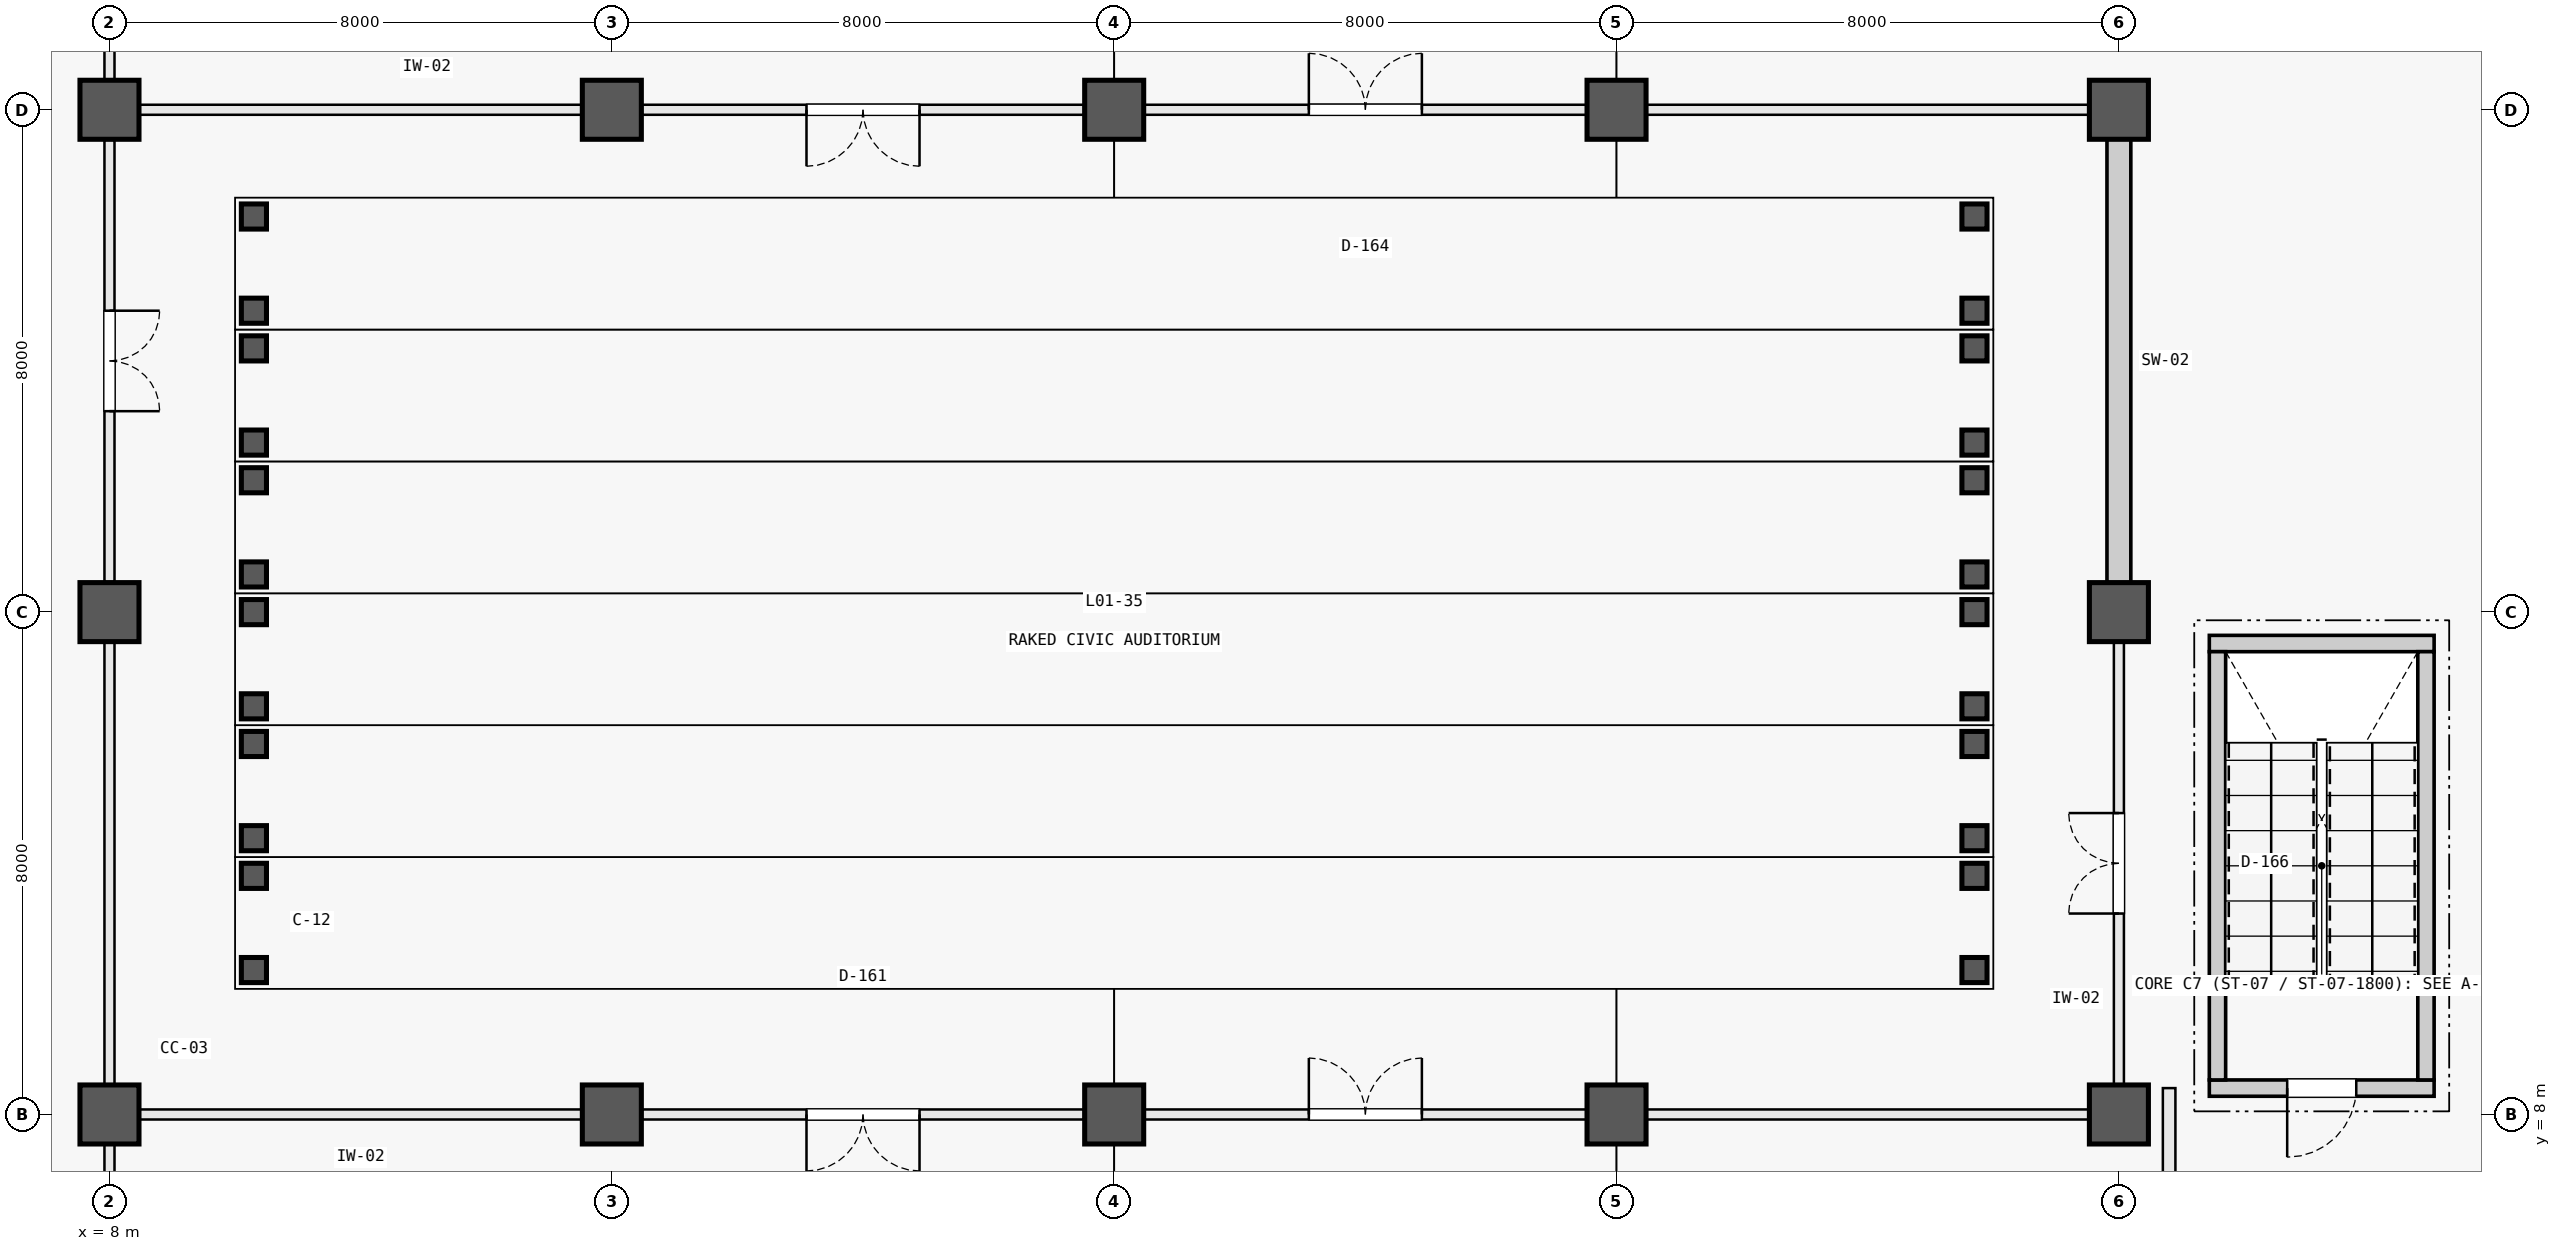
"""IFC4 building model, lengths in metres.
Left out: names, types, materials, properties, quantities, classifications, styles, units other than length and angle.
Written with IfcOpenShell. Run it as: python <this file> out.ifc"""

import sys

from ifc_helpers import new_model, si_unit, direction, frame, frame_2d, origin, origin_2d, place, context, subcontext, project, spatial, rectangle, circle, extrude, element, fill, save


model = new_model("IFC4")
c1 = context("Model", 3, precision=1e-05, world=origin(), true_north=direction((0.0, 1.0)))
c2 = subcontext(c1, "Body", "Model", "MODEL_VIEW")
j1 = project(units=[si_unit("LENGTHUNIT", "METRE"), si_unit("PLANEANGLEUNIT", "RADIAN")], contexts=[c1])
p1 = place(None, origin())
s1 = spatial("IfcSite", under=j1, at=p1, CompositionType="ELEMENT")
p2 = place(p1, origin())
s2 = spatial("IfcBuilding", under=s1, at=p2, CompositionType="ELEMENT")
p3 = place(p2, origin())
s3 = spatial("IfcBuildingStorey", under=s2, at=p3, CompositionType="ELEMENT", Elevation=0.0)
for number, where, z_axis, x_axis in (
    (1, (8.0, 8.0, 0.0), (0.0, 0.0, 1.0), (1.0, 0.0, 0.0)),
    (2, (8.0, 16.0, 0.0), (0.0, 0.0, 1.0), (1.0, 0.0, 0.0)),
    (3, (8.0, 24.0, 0.0), (0.0, 0.0, 1.0), (1.0, 0.0, 0.0)),
    (4, (16.0, 8.0, 0.0), (0.0, 0.0, 1.0), (1.0, 0.0, 0.0)),
    (5, (16.0, 24.0, 0.0), (0.0, 0.0, 1.0), (1.0, 0.0, 0.0)),
    (6, (24.0, 8.0, 0.0), (0.0, 0.0, 1.0), (1.0, 0.0, 0.0)),
    (7, (24.0, 24.0, 0.0), (0.0, 0.0, 1.0), (1.0, 0.0, 0.0)),
    (8, (32.0, 8.0, 0.0), (0.0, 0.0, 1.0), (1.0, 0.0, 0.0)),
    (9, (32.0, 24.0, 0.0), (0.0, 0.0, 1.0), (1.0, 0.0, 0.0)),
    (10, (40.0, 8.0, 0.0), (0.0, 0.0, 1.0), (1.0, 0.0, 0.0)),
    (11, (40.0, 16.0, 0.0), (0.0, 0.0, 1.0), (1.0, 0.0, 0.0)),
    (12, (40.0, 24.0, 0.0), (0.0, 0.0, 1.0), (1.0, 0.0, 0.0)),
):
    element("IfcColumn", number, at=place(p3, frame(where, z_axis=z_axis, x_axis=x_axis)), inside=s3, PredefinedType="COLUMN", context=c2, shape_type="SweptSolid", body=[
        extrude(circle(Radius=0.47, at=origin_2d()), origin(), (0.0, 0.0, 1.0), 5.4),
    ])
p4 = place(p3, frame((40.0, 16.47, 0.0), z_axis=(0.0, 0.0, 1.0), x_axis=(0.0, 1.0, 0.0)))
e13 = element("IfcWall", 13, at=p4, inside=s3, PredefinedType="SHEAR", context=c2, shape_type="SweptSolid", body=[
    extrude(rectangle(XDim=7.06, YDim=0.38, at=frame_2d((3.53, 0.0))), origin(), (0.0, 0.0, 1.0), 5.03),
])
for number, where, z_axis, x_axis in (
    (14, (10.3, 10.3, 0.0), (0.0, 0.0, 1.0), (1.0, 0.0, 0.0)),
    (15, (37.7, 10.3, 0.0), (0.0, 0.0, 1.0), (1.0, 0.0, 0.0)),
    (16, (37.7, 11.8, 0.0), (0.0, 0.0, 1.0), (1.0, 0.0, 0.0)),
    (17, (10.3, 11.8, 0.0), (0.0, 0.0, 1.0), (1.0, 0.0, 0.0)),
):
    element("IfcColumn", number, at=place(p3, frame(where, z_axis=z_axis, x_axis=x_axis)), inside=s3, PredefinedType="COLUMN", context=c2, shape_type="SweptSolid", body=[
        extrude(rectangle(XDim=0.4, YDim=0.4, at=origin_2d()), origin(), (0.0, 0.0, 1.0), 0.12),
    ])
for number, where, z_axis, x_axis in (
    (18, (10.3, 12.4, 0.0), (0.0, 0.0, 1.0), (1.0, 0.0, 0.0)),
    (19, (37.7, 12.4, 0.0), (0.0, 0.0, 1.0), (1.0, 0.0, 0.0)),
    (20, (37.7, 13.9, 0.0), (0.0, 0.0, 1.0), (1.0, 0.0, 0.0)),
    (21, (10.3, 13.9, 0.0), (0.0, 0.0, 1.0), (1.0, 0.0, 0.0)),
):
    element("IfcColumn", number, at=place(p3, frame(where, z_axis=z_axis, x_axis=x_axis)), inside=s3, PredefinedType="COLUMN", context=c2, shape_type="SweptSolid", body=[
        extrude(rectangle(XDim=0.4, YDim=0.4, at=origin_2d()), origin(), (0.0, 0.0, 1.0), 0.41),
    ])
for number, where, z_axis, x_axis in (
    (22, (10.3, 14.5, 0.0), (0.0, 0.0, 1.0), (1.0, 0.0, 0.0)),
    (23, (37.7, 14.5, 0.0), (0.0, 0.0, 1.0), (1.0, 0.0, 0.0)),
    (24, (37.7, 16.0, 0.0), (0.0, 0.0, 1.0), (1.0, 0.0, 0.0)),
    (25, (10.3, 16.0, 0.0), (0.0, 0.0, 1.0), (1.0, 0.0, 0.0)),
):
    element("IfcColumn", number, at=place(p3, frame(where, z_axis=z_axis, x_axis=x_axis)), inside=s3, PredefinedType="COLUMN", context=c2, shape_type="SweptSolid", body=[
        extrude(rectangle(XDim=0.4, YDim=0.4, at=origin_2d()), origin(), (0.0, 0.0, 1.0), 0.7),
    ])
for number, where, z_axis, x_axis in (
    (26, (10.3, 16.6, 0.0), (0.0, 0.0, 1.0), (1.0, 0.0, 0.0)),
    (27, (37.7, 16.6, 0.0), (0.0, 0.0, 1.0), (1.0, 0.0, 0.0)),
    (28, (37.7, 18.1, 0.0), (0.0, 0.0, 1.0), (1.0, 0.0, 0.0)),
    (29, (10.3, 18.1, 0.0), (0.0, 0.0, 1.0), (1.0, 0.0, 0.0)),
):
    element("IfcColumn", number, at=place(p3, frame(where, z_axis=z_axis, x_axis=x_axis)), inside=s3, PredefinedType="COLUMN", context=c2, shape_type="SweptSolid", body=[
        extrude(rectangle(XDim=0.4, YDim=0.4, at=origin_2d()), origin(), (0.0, 0.0, 1.0), 0.99),
    ])
for number, where, z_axis, x_axis in (
    (30, (10.3, 18.7, 0.0), (0.0, 0.0, 1.0), (1.0, 0.0, 0.0)),
    (31, (37.7, 18.7, 0.0), (0.0, 0.0, 1.0), (1.0, 0.0, 0.0)),
    (32, (37.7, 20.2, 0.0), (0.0, 0.0, 1.0), (1.0, 0.0, 0.0)),
    (33, (10.3, 20.2, 0.0), (0.0, 0.0, 1.0), (1.0, 0.0, 0.0)),
):
    element("IfcColumn", number, at=place(p3, frame(where, z_axis=z_axis, x_axis=x_axis)), inside=s3, PredefinedType="COLUMN", context=c2, shape_type="SweptSolid", body=[
        extrude(rectangle(XDim=0.4, YDim=0.4, at=origin_2d()), origin(), (0.0, 0.0, 1.0), 1.28),
    ])
for number, where, z_axis, x_axis in (
    (34, (10.3, 20.8, 0.0), (0.0, 0.0, 1.0), (1.0, 0.0, 0.0)),
    (35, (37.7, 20.8, 0.0), (0.0, 0.0, 1.0), (1.0, 0.0, 0.0)),
    (36, (37.7, 22.3, 0.0), (0.0, 0.0, 1.0), (1.0, 0.0, 0.0)),
    (37, (10.3, 22.3, 0.0), (0.0, 0.0, 1.0), (1.0, 0.0, 0.0)),
):
    element("IfcColumn", number, at=place(p3, frame(where, z_axis=z_axis, x_axis=x_axis)), inside=s3, PredefinedType="COLUMN", context=c2, shape_type="SweptSolid", body=[
        extrude(rectangle(XDim=0.4, YDim=0.4, at=origin_2d()), origin(), (0.0, 0.0, 1.0), 1.57),
    ])
p5 = place(p3, frame((41.44, 8.42, 0.0), z_axis=(0.0, 0.0, 1.0), x_axis=(1.0, 0.0, 0.0)))
e38 = element("IfcWall", 38, at=p5, inside=s3, PredefinedType="SOLIDWALL", context=c2, shape_type="SweptSolid", body=[
    extrude(rectangle(XDim=3.58, YDim=0.26, at=frame_2d((1.79, 0.0))), origin(), (0.0, 0.0, 1.0), 5.4),
])
p6 = place(p5, frame((1.24, 0.0, 0.0)))
e39 = element("IfcOpeningElement", 39, at=p6, cuts=e38, PredefinedType="OPENING", context=c2, shape_type="SweptSolid", body=[
    extrude(rectangle(XDim=1.1, YDim=2.2, at=frame_2d((0.55, 1.1))), frame((0.0, 0.142, 0.0), z_axis=(0.0, -1.0, 0.0), x_axis=(1.0, 0.0, 0.0)), (0.0, 0.0, 1.0), 0.284),
])
p7 = place(p3, frame((41.44, 15.5, 0.0), z_axis=(0.0, 0.0, 1.0), x_axis=(1.0, 0.0, 0.0)))
e40 = element("IfcWall", 40, at=p7, inside=s3, PredefinedType="SOLIDWALL", context=c2, shape_type="SweptSolid", body=[
    extrude(rectangle(XDim=3.58, YDim=0.26, at=frame_2d((1.79, 0.0))), origin(), (0.0, 0.0, 1.0), 5.4),
])
for number, where, z_axis, x_axis in (
    (41, (41.57, 8.55, 0.0), (0.0, 0.0, 1.0), (0.0, 1.0, 0.0)),
    (42, (44.89, 8.55, 0.0), (0.0, 0.0, 1.0), (0.0, 1.0, 0.0)),
):
    element("IfcWall", number, at=place(p3, frame(where, z_axis=z_axis, x_axis=x_axis)), inside=s3, PredefinedType="SOLIDWALL", context=c2, shape_type="SweptSolid", body=[
        extrude(rectangle(XDim=6.82, YDim=0.26, at=frame_2d((3.41, 0.0))), origin(), (0.0, 0.0, 1.0), 5.4),
    ])
p8 = place(p3, frame((40.8, 0.26, 0.0), z_axis=(0.0, 0.0, 1.0), x_axis=(0.0, 1.0, 0.0)))
e43 = element("IfcWall", 43, at=p8, inside=s3, PredefinedType="PARTITIONING", context=c2, shape_type="SweptSolid", body=[
    extrude(rectangle(XDim=8.16, YDim=0.2, at=frame_2d((4.08, 0.0))), origin(), (0.0, 0.0, 1.0), 3.88),
])
p9 = place(p8, frame((3.48, 0.0, 0.0)))
e44 = element("IfcOpeningElement", 44, at=p9, cuts=e43, PredefinedType="OPENING", context=c2, shape_type="SweptSolid", body=[
    extrude(rectangle(XDim=1.2, YDim=2.25, at=frame_2d((0.6, 1.125))), frame((0.0, 0.112, 0.0), z_axis=(0.0, -1.0, 0.0), x_axis=(1.0, 0.0, 0.0)), (0.0, 0.0, 1.0), 0.224),
])
p10 = place(p3, frame((8.48, 8.0, 0.0), z_axis=(0.0, 0.0, 1.0), x_axis=(1.0, 0.0, 0.0)))
e45 = element("IfcWall", 45, at=p10, inside=s3, PredefinedType="PARTITIONING", context=c2, shape_type="SweptSolid", body=[
    extrude(rectangle(XDim=7.04, YDim=0.16, at=frame_2d((3.52, 0.0))), origin(), (0.0, 0.0, 1.0), 3.88),
])
p11 = place(p3, frame((16.48, 8.0, 0.0), z_axis=(0.0, 0.0, 1.0), x_axis=(1.0, 0.0, 0.0)))
e46 = element("IfcWall", 46, at=p11, inside=s3, PredefinedType="PARTITIONING", context=c2, shape_type="SweptSolid", body=[
    extrude(rectangle(XDim=7.04, YDim=0.16, at=frame_2d((3.52, 0.0))), origin(), (0.0, 0.0, 1.0), 3.88),
])
p12 = place(p11, frame((2.62, 0.0, 0.0)))
e47 = element("IfcOpeningElement", 47, at=p12, cuts=e46, PredefinedType="OPENING", context=c2, shape_type="SweptSolid", body=[
    extrude(rectangle(XDim=1.8, YDim=2.3, at=frame_2d((0.9, 1.15))), frame((0.0, 0.092, 0.0), z_axis=(0.0, -1.0, 0.0), x_axis=(1.0, 0.0, 0.0)), (0.0, 0.0, 1.0), 0.184),
])
p13 = place(p3, frame((24.48, 8.0, 0.0), z_axis=(0.0, 0.0, 1.0), x_axis=(1.0, 0.0, 0.0)))
e48 = element("IfcWall", 48, at=p13, inside=s3, PredefinedType="PARTITIONING", context=c2, shape_type="SweptSolid", body=[
    extrude(rectangle(XDim=7.04, YDim=0.16, at=frame_2d((3.52, 0.0))), origin(), (0.0, 0.0, 1.0), 3.88),
])
p14 = place(p13, frame((2.62, 0.0, 0.0)))
e49 = element("IfcOpeningElement", 49, at=p14, cuts=e48, PredefinedType="OPENING", context=c2, shape_type="SweptSolid", body=[
    extrude(rectangle(XDim=1.8, YDim=2.3, at=frame_2d((0.9, 1.15))), frame((0.0, 0.092, 0.0), z_axis=(0.0, -1.0, 0.0), x_axis=(1.0, 0.0, 0.0)), (0.0, 0.0, 1.0), 0.184),
])
for number, where, z_axis, x_axis in (
    (50, (32.48, 8.0, 0.0), (0.0, 0.0, 1.0), (1.0, 0.0, 0.0)),
    (51, (8.48, 24.0, 0.0), (0.0, 0.0, 1.0), (1.0, 0.0, 0.0)),
):
    element("IfcWall", number, at=place(p3, frame(where, z_axis=z_axis, x_axis=x_axis)), inside=s3, PredefinedType="PARTITIONING", context=c2, shape_type="SweptSolid", body=[
        extrude(rectangle(XDim=7.04, YDim=0.16, at=frame_2d((3.52, 0.0))), origin(), (0.0, 0.0, 1.0), 3.88),
    ])
p15 = place(p3, frame((16.48, 24.0, 0.0), z_axis=(0.0, 0.0, 1.0), x_axis=(1.0, 0.0, 0.0)))
e52 = element("IfcWall", 52, at=p15, inside=s3, PredefinedType="PARTITIONING", context=c2, shape_type="SweptSolid", body=[
    extrude(rectangle(XDim=7.04, YDim=0.16, at=frame_2d((3.52, 0.0))), origin(), (0.0, 0.0, 1.0), 3.88),
])
p16 = place(p15, frame((2.62, 0.0, 0.0)))
e53 = element("IfcOpeningElement", 53, at=p16, cuts=e52, PredefinedType="OPENING", context=c2, shape_type="SweptSolid", body=[
    extrude(rectangle(XDim=1.8, YDim=2.3, at=frame_2d((0.9, 1.15))), frame((0.0, 0.092, 0.0), z_axis=(0.0, -1.0, 0.0), x_axis=(1.0, 0.0, 0.0)), (0.0, 0.0, 1.0), 0.184),
])
p17 = place(p3, frame((24.48, 24.0, 0.0), z_axis=(0.0, 0.0, 1.0), x_axis=(1.0, 0.0, 0.0)))
e54 = element("IfcWall", 54, at=p17, inside=s3, PredefinedType="PARTITIONING", context=c2, shape_type="SweptSolid", body=[
    extrude(rectangle(XDim=7.04, YDim=0.16, at=frame_2d((3.52, 0.0))), origin(), (0.0, 0.0, 1.0), 3.88),
])
p18 = place(p17, frame((2.62, 0.0, 0.0)))
e55 = element("IfcOpeningElement", 55, at=p18, cuts=e54, PredefinedType="OPENING", context=c2, shape_type="SweptSolid", body=[
    extrude(rectangle(XDim=1.8, YDim=2.3, at=frame_2d((0.9, 1.15))), frame((0.0, 0.092, 0.0), z_axis=(0.0, -1.0, 0.0), x_axis=(1.0, 0.0, 0.0)), (0.0, 0.0, 1.0), 0.184),
])
for number, where, z_axis, x_axis in (
    (56, (32.48, 24.0, 0.0), (0.0, 0.0, 1.0), (1.0, 0.0, 0.0)),
    (57, (8.0, 0.48, 0.0), (0.0, 0.0, 1.0), (0.0, 1.0, 0.0)),
    (58, (8.0, 8.48, 0.0), (0.0, 0.0, 1.0), (0.0, 1.0, 0.0)),
):
    element("IfcWall", number, at=place(p3, frame(where, z_axis=z_axis, x_axis=x_axis)), inside=s3, PredefinedType="PARTITIONING", context=c2, shape_type="SweptSolid", body=[
        extrude(rectangle(XDim=7.04, YDim=0.16, at=frame_2d((3.52, 0.0))), origin(), (0.0, 0.0, 1.0), 3.88),
    ])
p19 = place(p3, frame((8.0, 16.48, 0.0), z_axis=(0.0, 0.0, 1.0), x_axis=(0.0, 1.0, 0.0)))
e59 = element("IfcWall", 59, at=p19, inside=s3, PredefinedType="PARTITIONING", context=c2, shape_type="SweptSolid", body=[
    extrude(rectangle(XDim=7.04, YDim=0.16, at=frame_2d((3.52, 0.0))), origin(), (0.0, 0.0, 1.0), 3.88),
])
p20 = place(p19, frame((2.72, 0.0, 0.0)))
e60 = element("IfcOpeningElement", 60, at=p20, cuts=e59, PredefinedType="OPENING", context=c2, shape_type="SweptSolid", body=[
    extrude(rectangle(XDim=1.6, YDim=2.2, at=frame_2d((0.8, 1.1))), frame((0.0, 0.092, 0.0), z_axis=(0.0, -1.0, 0.0), x_axis=(1.0, 0.0, 0.0)), (0.0, 0.0, 1.0), 0.184),
])
p21 = place(p3, frame((8.0, 24.48, 0.0), z_axis=(0.0, 0.0, 1.0), x_axis=(0.0, 1.0, 0.0)))
e61 = element("IfcWall", 61, at=p21, inside=s3, PredefinedType="PARTITIONING", context=c2, shape_type="SweptSolid", body=[
    extrude(rectangle(XDim=7.04, YDim=0.16, at=frame_2d((3.52, 0.0))), origin(), (0.0, 0.0, 1.0), 3.88),
])
p22 = place(p3, frame((40.0, 8.48, 0.0), z_axis=(0.0, 0.0, 1.0), x_axis=(0.0, 1.0, 0.0)))
e62 = element("IfcWall", 62, at=p22, inside=s3, PredefinedType="PARTITIONING", context=c2, shape_type="SweptSolid", body=[
    extrude(rectangle(XDim=7.04, YDim=0.16, at=frame_2d((3.52, 0.0))), origin(), (0.0, 0.0, 1.0), 3.88),
])
p23 = place(p22, frame((2.72, 0.0, 0.0)))
e63 = element("IfcOpeningElement", 63, at=p23, cuts=e62, PredefinedType="OPENING", context=c2, shape_type="SweptSolid", body=[
    extrude(rectangle(XDim=1.6, YDim=2.2, at=frame_2d((0.8, 1.1))), frame((0.0, 0.092, 0.0), z_axis=(0.0, -1.0, 0.0), x_axis=(1.0, 0.0, 0.0)), (0.0, 0.0, 1.0), 0.184),
])
p24 = place(p6, frame((1.1, 0.0, 0.0), z_axis=(0.0, 0.0, 1.0), x_axis=(-1.0, 0.0, 0.0)))
e64 = element("IfcDoor", 64, at=p24, inside=s3, OperationType="SINGLE_SWING_LEFT", PredefinedType="DOOR", context=c2, shape_type="SweptSolid", body=[
    extrude(rectangle(XDim=1.1, YDim=2.2, at=frame_2d((0.55, 1.1))), frame((0.0, 0.025, 0.0), z_axis=(0.0, -1.0, 0.0), x_axis=(1.0, 0.0, 0.0)), (0.0, 0.0, 1.0), 0.05),
])
fill(e39, e64)
p25 = place(p12, frame((1.8, 0.0, 0.0), z_axis=(0.0, 0.0, 1.0), x_axis=(-1.0, 0.0, 0.0)))
e65 = element("IfcDoor", 65, at=p25, inside=s3, OperationType="DOUBLE_DOOR_SINGLE_SWING", PredefinedType="DOOR", context=c2, shape_type="SweptSolid", body=[
    extrude(rectangle(XDim=1.8, YDim=2.3, at=frame_2d((0.9, 1.15))), frame((0.0, 0.025, 0.0), z_axis=(0.0, -1.0, 0.0), x_axis=(1.0, 0.0, 0.0)), (0.0, 0.0, 1.0), 0.05),
])
fill(e47, e65)
p26 = place(p14, origin())
e66 = element("IfcDoor", 66, at=p26, inside=s3, OperationType="DOUBLE_DOOR_SINGLE_SWING", PredefinedType="DOOR", context=c2, shape_type="SweptSolid", body=[
    extrude(rectangle(XDim=1.8, YDim=2.3, at=frame_2d((0.9, 1.15))), frame((0.0, 0.025, 0.0), z_axis=(0.0, -1.0, 0.0), x_axis=(1.0, 0.0, 0.0)), (0.0, 0.0, 1.0), 0.05),
])
fill(e49, e66)
p27 = place(p16, frame((1.8, 0.0, 0.0), z_axis=(0.0, 0.0, 1.0), x_axis=(-1.0, 0.0, 0.0)))
e67 = element("IfcDoor", 67, at=p27, inside=s3, OperationType="DOUBLE_DOOR_SINGLE_SWING", PredefinedType="DOOR", context=c2, shape_type="SweptSolid", body=[
    extrude(rectangle(XDim=1.8, YDim=2.3, at=frame_2d((0.9, 1.15))), frame((0.0, 0.025, 0.0), z_axis=(0.0, -1.0, 0.0), x_axis=(1.0, 0.0, 0.0)), (0.0, 0.0, 1.0), 0.05),
])
fill(e53, e67)
p28 = place(p18, origin())
e68 = element("IfcDoor", 68, at=p28, inside=s3, OperationType="DOUBLE_DOOR_SINGLE_SWING", PredefinedType="DOOR", context=c2, shape_type="SweptSolid", body=[
    extrude(rectangle(XDim=1.8, YDim=2.3, at=frame_2d((0.9, 1.15))), frame((0.0, 0.025, 0.0), z_axis=(0.0, -1.0, 0.0), x_axis=(1.0, 0.0, 0.0)), (0.0, 0.0, 1.0), 0.05),
])
fill(e55, e68)
p29 = place(p20, frame((1.6, 0.0, 0.0), z_axis=(0.0, 0.0, 1.0), x_axis=(-1.0, 0.0, 0.0)))
e69 = element("IfcDoor", 69, at=p29, inside=s3, OperationType="DOUBLE_DOOR_SINGLE_SWING", PredefinedType="DOOR", context=c2, shape_type="SweptSolid", body=[
    extrude(rectangle(XDim=1.6, YDim=2.2, at=frame_2d((0.8, 1.1))), frame((0.0, 0.025, 0.0), z_axis=(0.0, -1.0, 0.0), x_axis=(1.0, 0.0, 0.0)), (0.0, 0.0, 1.0), 0.05),
])
fill(e60, e69)
p30 = place(p23, origin())
e70 = element("IfcDoor", 70, at=p30, inside=s3, OperationType="DOUBLE_DOOR_SINGLE_SWING", PredefinedType="DOOR", context=c2, shape_type="SweptSolid", body=[
    extrude(rectangle(XDim=1.6, YDim=2.2, at=frame_2d((0.8, 1.1))), frame((0.0, 0.025, 0.0), z_axis=(0.0, -1.0, 0.0), x_axis=(1.0, 0.0, 0.0)), (0.0, 0.0, 1.0), 0.05),
])
fill(e63, e70)
save(model, sys.argv[1])
